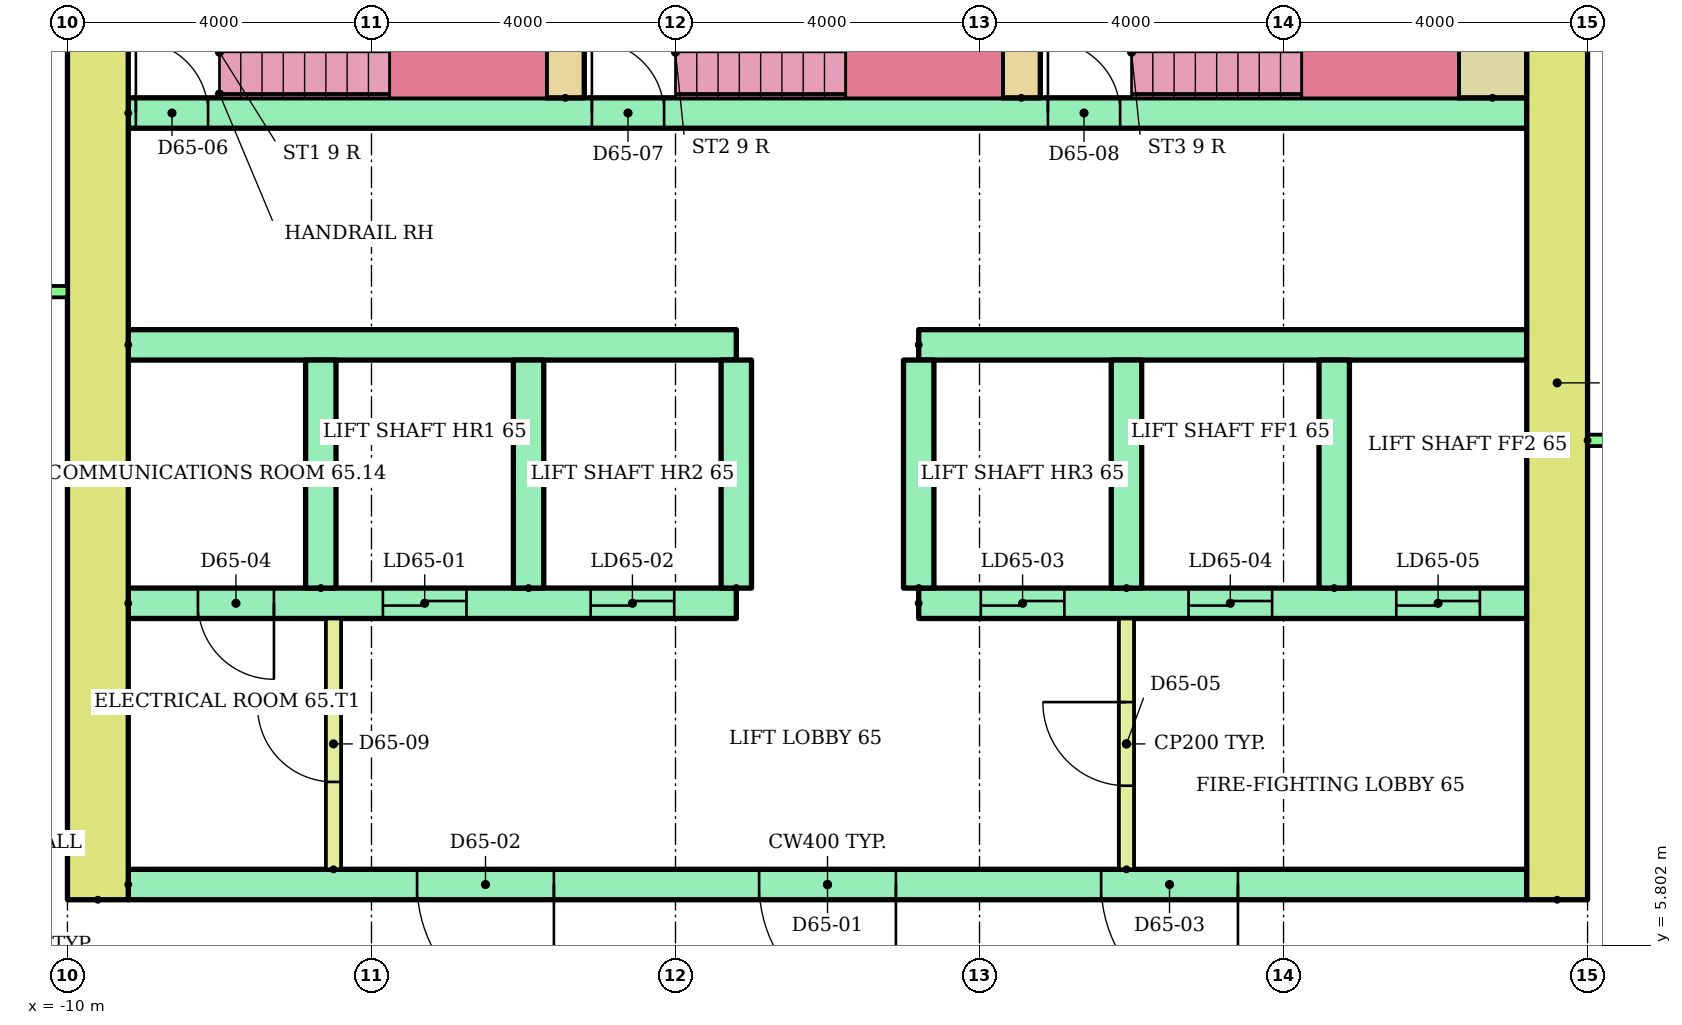
"""IFC4 building model, lengths in metres.
Left out: names, types, materials, properties, quantities, classifications, styles, units other than length and angle.
Written with IfcOpenShell. Run it as: python <this file> out.ifc"""

import sys

from ifc_helpers import new_model, si_unit, direction, frame, frame_2d, origin, place, context, subcontext, project, spatial, rectangle, extrude, element, fill, save


model = new_model("IFC4")
c1 = context("Model", 3, precision=1e-05, world=origin(), true_north=direction((0.0, 1.0)))
c2 = subcontext(c1, "Body", "Model", "MODEL_VIEW")
j1 = project(units=[si_unit("LENGTHUNIT", "METRE"), si_unit("PLANEANGLEUNIT", "RADIAN")], contexts=[c1])
p1 = place(None, origin())
s1 = spatial("IfcSite", under=j1, at=p1, CompositionType="ELEMENT")
p2 = place(p1, origin())
s2 = spatial("IfcBuilding", under=s1, at=p2, CompositionType="ELEMENT")
p3 = place(p2, frame((0.0, 0.0, 253.1)))
s3 = spatial("IfcBuildingStorey", under=s2, at=p3, CompositionType="ELEMENT", Elevation=253.1)
for number, where, z_axis, x_axis in (
    (1, (-9.6, 6.4, 0.0), (0.0, 0.0, 1.0), (0.0, 1.0, 0.0)),
    (2, (9.6, 6.4, 0.0), (0.0, 0.0, 1.0), (0.0, 1.0, 0.0)),
):
    element("IfcWall", number, at=place(p3, frame(where, z_axis=z_axis, x_axis=x_axis)), inside=s3, PredefinedType="SHEAR", context=c2, shape_type="SweptSolid", body=[
        extrude(rectangle(XDim=13.6, YDim=0.8, at=frame_2d((6.8, 0.0))), origin(), (0.0, 0.0, 1.0), 2.92),
    ])
p4 = place(p3, frame((-9.2, 6.6, 0.0)))
e3 = element("IfcWall", 3, at=p4, inside=s3, PredefinedType="SHEAR", context=c2, shape_type="SweptSolid", body=[
    extrude(rectangle(XDim=18.4, YDim=0.4, at=frame_2d((9.2, 0.0))), origin(), (0.0, 0.0, 1.0), 2.92),
])
p5 = place(p4, frame((8.3, 0.0, 0.0)))
e4 = element("IfcOpeningElement", 4, at=p5, cuts=e3, PredefinedType="OPENING", context=c2, shape_type="SweptSolid", body=[
    extrude(rectangle(XDim=1.8, YDim=2.1, at=frame_2d((0.9, 1.05))), frame((0.0, 0.21, 0.0), z_axis=(0.0, -1.0, 0.0), x_axis=(1.0, 0.0, 0.0)), (0.0, 0.0, 1.0), 0.42),
])
p6 = place(p4, frame((3.8, 0.0, 0.0)))
e5 = element("IfcOpeningElement", 5, at=p6, cuts=e3, PredefinedType="OPENING", context=c2, shape_type="SweptSolid", body=[
    extrude(rectangle(XDim=1.8, YDim=2.1, at=frame_2d((0.9, 1.05))), frame((0.0, 0.21, 0.0), z_axis=(0.0, -1.0, 0.0), x_axis=(1.0, 0.0, 0.0)), (0.0, 0.0, 1.0), 0.42),
])
p7 = place(p4, frame((12.8, 0.0, 0.0)))
e6 = element("IfcOpeningElement", 6, at=p7, cuts=e3, PredefinedType="OPENING", context=c2, shape_type="SweptSolid", body=[
    extrude(rectangle(XDim=1.8, YDim=2.1, at=frame_2d((0.9, 1.05))), frame((0.0, 0.21, 0.0), z_axis=(0.0, -1.0, 0.0), x_axis=(1.0, 0.0, 0.0)), (0.0, 0.0, 1.0), 0.42),
])
p8 = place(p3, frame((-9.2, 10.3, 0.0)))
e7 = element("IfcWall", 7, at=p8, inside=s3, PredefinedType="SHEAR", context=c2, shape_type="SweptSolid", body=[
    extrude(rectangle(XDim=8.0, YDim=0.4, at=frame_2d((4.0, 0.0))), origin(), (0.0, 0.0, 1.0), 2.92),
])
p9 = place(p8, frame((3.35, 0.0, 0.0)))
e8 = element("IfcOpeningElement", 8, at=p9, cuts=e7, PredefinedType="OPENING", context=c2, shape_type="SweptSolid", body=[
    extrude(rectangle(XDim=1.1, YDim=2.1, at=frame_2d((0.55, 1.05))), frame((0.0, 0.21, 0.0), z_axis=(0.0, -1.0, 0.0), x_axis=(1.0, 0.0, 0.0)), (0.0, 0.0, 1.0), 0.42),
])
p10 = place(p8, frame((6.083, 0.0, 0.0)))
e9 = element("IfcOpeningElement", 9, at=p10, cuts=e7, PredefinedType="OPENING", context=c2, shape_type="SweptSolid", body=[
    extrude(rectangle(XDim=1.1, YDim=2.1, at=frame_2d((0.55, 1.05))), frame((0.0, 0.21, 0.0), z_axis=(0.0, -1.0, 0.0), x_axis=(1.0, 0.0, 0.0)), (0.0, 0.0, 1.0), 0.42),
])
p11 = place(p8, frame((0.917, 0.0, 0.0)))
e10 = element("IfcOpeningElement", 10, at=p11, cuts=e7, PredefinedType="OPENING", context=c2, shape_type="SweptSolid", body=[
    extrude(rectangle(XDim=1.0, YDim=2.1, at=frame_2d((0.5, 1.05))), frame((0.0, 0.21, 0.0), z_axis=(0.0, -1.0, 0.0), x_axis=(1.0, 0.0, 0.0)), (0.0, 0.0, 1.0), 0.42),
])
p12 = place(p3, frame((-9.2, 13.7, 0.0)))
e11 = element("IfcWall", 11, at=p12, inside=s3, PredefinedType="SHEAR", context=c2, shape_type="SweptSolid", body=[
    extrude(rectangle(XDim=8.0, YDim=0.4, at=frame_2d((4.0, 0.0))), origin(), (0.0, 0.0, 1.0), 2.92),
])
p13 = place(p3, frame((1.2, 10.3, 0.0)))
e12 = element("IfcWall", 12, at=p13, inside=s3, PredefinedType="SHEAR", context=c2, shape_type="SweptSolid", body=[
    extrude(rectangle(XDim=8.0, YDim=0.4, at=frame_2d((4.0, 0.0))), origin(), (0.0, 0.0, 1.0), 2.92),
])
p14 = place(p13, frame((0.817, 0.0, 0.0)))
e13 = element("IfcOpeningElement", 13, at=p14, cuts=e12, PredefinedType="OPENING", context=c2, shape_type="SweptSolid", body=[
    extrude(rectangle(XDim=1.1, YDim=2.1, at=frame_2d((0.55, 1.05))), frame((0.0, 0.21, 0.0), z_axis=(0.0, -1.0, 0.0), x_axis=(1.0, 0.0, 0.0)), (0.0, 0.0, 1.0), 0.42),
])
p15 = place(p13, frame((3.55, 0.0, 0.0)))
e14 = element("IfcOpeningElement", 14, at=p15, cuts=e12, PredefinedType="OPENING", context=c2, shape_type="SweptSolid", body=[
    extrude(rectangle(XDim=1.1, YDim=2.1, at=frame_2d((0.55, 1.05))), frame((0.0, 0.21, 0.0), z_axis=(0.0, -1.0, 0.0), x_axis=(1.0, 0.0, 0.0)), (0.0, 0.0, 1.0), 0.42),
])
p16 = place(p13, frame((6.283, 0.0, 0.0)))
e15 = element("IfcOpeningElement", 15, at=p16, cuts=e12, PredefinedType="OPENING", context=c2, shape_type="SweptSolid", body=[
    extrude(rectangle(XDim=1.1, YDim=2.1, at=frame_2d((0.55, 1.05))), frame((0.0, 0.21, 0.0), z_axis=(0.0, -1.0, 0.0), x_axis=(1.0, 0.0, 0.0)), (0.0, 0.0, 1.0), 0.42),
])
p17 = place(p3, frame((1.2, 13.7, 0.0)))
e16 = element("IfcWall", 16, at=p17, inside=s3, PredefinedType="SHEAR", context=c2, shape_type="SweptSolid", body=[
    extrude(rectangle(XDim=8.0, YDim=0.4, at=frame_2d((4.0, 0.0))), origin(), (0.0, 0.0, 1.0), 2.92),
])
for number, where, z_axis, x_axis in (
    (17, (-6.667, 10.5, 0.0), (0.0, 0.0, 1.0), (0.0, 1.0, 0.0)),
    (18, (-3.933, 10.5, 0.0), (0.0, 0.0, 1.0), (0.0, 1.0, 0.0)),
    (19, (-1.2, 10.5, 0.0), (0.0, 0.0, 1.0), (0.0, 1.0, 0.0)),
    (20, (1.2, 10.5, 0.0), (0.0, 0.0, 1.0), (0.0, 1.0, 0.0)),
    (21, (3.933, 10.5, 0.0), (0.0, 0.0, 1.0), (0.0, 1.0, 0.0)),
    (22, (6.667, 10.5, 0.0), (0.0, 0.0, 1.0), (0.0, 1.0, 0.0)),
):
    element("IfcWall", number, at=place(p3, frame(where, z_axis=z_axis, x_axis=x_axis)), inside=s3, PredefinedType="SHEAR", context=c2, shape_type="SweptSolid", body=[
        extrude(rectangle(XDim=3.0, YDim=0.4, at=frame_2d((1.5, 0.0))), origin(), (0.0, 0.0, 1.0), 2.92),
    ])
p18 = place(p3, frame((3.933, 6.8, 0.0), z_axis=(0.0, 0.0, 1.0), x_axis=(0.0, 1.0, 0.0)))
e23 = element("IfcWall", 23, at=p18, inside=s3, PredefinedType="PARTITIONING", context=c2, shape_type="SweptSolid", body=[
    extrude(rectangle(XDim=3.3, YDim=0.2, at=frame_2d((1.65, 0.0))), origin(), (0.0, 0.0, 1.0), 2.92),
])
p19 = place(p18, frame((1.1, 0.0, 0.0)))
e24 = element("IfcOpeningElement", 24, at=p19, cuts=e23, PredefinedType="OPENING", context=c2, shape_type="SweptSolid", body=[
    extrude(rectangle(XDim=1.1, YDim=2.1, at=frame_2d((0.55, 1.05))), frame((0.0, 0.11, 0.0), z_axis=(0.0, -1.0, 0.0), x_axis=(1.0, 0.0, 0.0)), (0.0, 0.0, 1.0), 0.22),
])
p20 = place(p3, frame((-9.2, 16.75, 0.0)))
e25 = element("IfcWall", 25, at=p20, inside=s3, PredefinedType="SHEAR", context=c2, shape_type="SweptSolid", body=[
    extrude(rectangle(XDim=18.4, YDim=0.4, at=frame_2d((9.2, 0.0))), origin(), (0.0, 0.0, 1.0), 2.92),
])
p21 = place(p20, frame((0.1, 0.0, 0.0)))
e26 = element("IfcOpeningElement", 26, at=p21, cuts=e25, PredefinedType="OPENING", context=c2, shape_type="SweptSolid", body=[
    extrude(rectangle(XDim=0.95, YDim=2.1, at=frame_2d((0.475, 1.05))), frame((0.0, 0.21, 0.0), z_axis=(0.0, -1.0, 0.0), x_axis=(1.0, 0.0, 0.0)), (0.0, 0.0, 1.0), 0.42),
])
p22 = place(p20, frame((6.1, 0.0, 0.0)))
e27 = element("IfcOpeningElement", 27, at=p22, cuts=e25, PredefinedType="OPENING", context=c2, shape_type="SweptSolid", body=[
    extrude(rectangle(XDim=0.95, YDim=2.1, at=frame_2d((0.475, 1.05))), frame((0.0, 0.21, 0.0), z_axis=(0.0, -1.0, 0.0), x_axis=(1.0, 0.0, 0.0)), (0.0, 0.0, 1.0), 0.42),
])
p23 = place(p20, frame((12.1, 0.0, 0.0)))
e28 = element("IfcOpeningElement", 28, at=p23, cuts=e25, PredefinedType="OPENING", context=c2, shape_type="SweptSolid", body=[
    extrude(rectangle(XDim=0.95, YDim=2.1, at=frame_2d((0.475, 1.05))), frame((0.0, 0.21, 0.0), z_axis=(0.0, -1.0, 0.0), x_axis=(1.0, 0.0, 0.0)), (0.0, 0.0, 1.0), 0.42),
])
for number, where, z_axis, x_axis in (
    (29, (-3.45, 16.95, 0.0), (0.0, 0.0, 1.0), (0.0, 1.0, 0.0)),
    (30, (2.55, 16.95, 0.0), (0.0, 0.0, 1.0), (0.0, 1.0, 0.0)),
):
    element("IfcWall", number, at=place(p3, frame(where, z_axis=z_axis, x_axis=x_axis)), inside=s3, PredefinedType="SHEAR", context=c2, shape_type="SweptSolid", body=[
        extrude(rectangle(XDim=2.55, YDim=0.5, at=frame_2d((1.275, 0.0))), origin(), (0.0, 0.0, 1.0), 2.92),
    ])
p24 = place(p3, frame((8.75, 16.95, 0.0), z_axis=(0.0, 0.0, 1.0), x_axis=(0.0, 1.0, 0.0)))
e31 = element("IfcWall", 31, at=p24, inside=s3, PredefinedType="SHEAR", context=c2, shape_type="SweptSolid", body=[
    extrude(rectangle(XDim=2.55, YDim=0.9, at=frame_2d((1.275, 0.0))), origin(), (0.0, 0.0, 1.0), 2.92),
])
p25 = place(p3, frame((-6.5, 6.8, 0.0), z_axis=(0.0, 0.0, 1.0), x_axis=(0.0, 1.0, 0.0)))
e32 = element("IfcWall", 32, at=p25, inside=s3, PredefinedType="PARTITIONING", context=c2, shape_type="SweptSolid", body=[
    extrude(rectangle(XDim=3.3, YDim=0.2, at=frame_2d((1.65, 0.0))), origin(), (0.0, 0.0, 1.0), 2.92),
])
p26 = place(p25, frame((1.15, 0.0, 0.0)))
e33 = element("IfcOpeningElement", 33, at=p26, cuts=e32, PredefinedType="OPENING", context=c2, shape_type="SweptSolid", body=[
    extrude(rectangle(XDim=1.0, YDim=2.1, at=frame_2d((0.5, 1.05))), frame((0.0, 0.11, 0.0), z_axis=(0.0, -1.0, 0.0), x_axis=(1.0, 0.0, 0.0)), (0.0, 0.0, 1.0), 0.22),
])
p27 = place(p3, frame((-21.89, 14.4, 0.0)))
e34 = element("IfcWall", 34, at=p27, inside=s3, PredefinedType="PARTITIONING", context=c2, shape_type="SweptSolid", body=[
    extrude(rectangle(XDim=11.89, YDim=0.15, at=frame_2d((5.945, 0.0))), origin(), (0.0, 0.0, 1.0), 2.4),
])
p28 = place(p27, frame((1.26, 0.0, 0.0)))
e35 = element("IfcOpeningElement", 35, at=p28, cuts=e34, PredefinedType="OPENING", context=c2, shape_type="SweptSolid", body=[
    extrude(rectangle(XDim=1.0, YDim=2.1, at=frame_2d((0.5, 1.05))), frame((0.0, 0.085, 0.0), z_axis=(0.0, -1.0, 0.0), x_axis=(1.0, 0.0, 0.0)), (0.0, 0.0, 1.0), 0.17),
])
p29 = place(p27, frame((8.304, 0.0, 0.0)))
e36 = element("IfcOpeningElement", 36, at=p29, cuts=e34, PredefinedType="OPENING", context=c2, shape_type="SweptSolid", body=[
    extrude(rectangle(XDim=0.9, YDim=2.1, at=frame_2d((0.45, 1.05))), frame((0.0, 0.085, 0.0), z_axis=(0.0, -1.0, 0.0), x_axis=(1.0, 0.0, 0.0)), (0.0, 0.0, 1.0), 0.17),
])
p30 = place(p3, frame((10.0, 12.443, 0.0)))
e37 = element("IfcWall", 37, at=p30, inside=s3, PredefinedType="PARTITIONING", context=c2, shape_type="SweptSolid", body=[
    extrude(rectangle(XDim=22.244, YDim=0.15, at=frame_2d((11.122, 0.0))), origin(), (0.0, 0.0, 1.0), 2.4),
])
p31 = place(p30, frame((3.47, 0.0, 0.0)))
e38 = element("IfcOpeningElement", 38, at=p31, cuts=e37, PredefinedType="OPENING", context=c2, shape_type="SweptSolid", body=[
    extrude(rectangle(XDim=0.9, YDim=2.1, at=frame_2d((0.45, 1.05))), frame((0.0, 0.085, 0.0), z_axis=(0.0, -1.0, 0.0), x_axis=(1.0, 0.0, 0.0)), (0.0, 0.0, 1.0), 0.17),
])
p32 = place(p30, frame((11.318, 0.0, 0.0)))
e39 = element("IfcOpeningElement", 39, at=p32, cuts=e37, PredefinedType="OPENING", context=c2, shape_type="SweptSolid", body=[
    extrude(rectangle(XDim=1.0, YDim=2.1, at=frame_2d((0.5, 1.05))), frame((0.0, 0.085, 0.0), z_axis=(0.0, -1.0, 0.0), x_axis=(1.0, 0.0, 0.0)), (0.0, 0.0, 1.0), 0.17),
])
p33 = place(p30, frame((18.477, 0.0, 0.0)))
e40 = element("IfcOpeningElement", 40, at=p33, cuts=e37, PredefinedType="OPENING", context=c2, shape_type="SweptSolid", body=[
    extrude(rectangle(XDim=0.9, YDim=2.1, at=frame_2d((0.45, 1.05))), frame((0.0, 0.085, 0.0), z_axis=(0.0, -1.0, 0.0), x_axis=(1.0, 0.0, 0.0)), (0.0, 0.0, 1.0), 0.17),
])
p34 = place(p5, frame((1.8, 0.0, 0.0), z_axis=(0.0, 0.0, 1.0), x_axis=(-1.0, 0.0, 0.0)))
e41 = element("IfcDoor", 41, at=p34, inside=s3, OperationType="DOUBLE_DOOR_SINGLE_SWING", PredefinedType="DOOR", context=c2, shape_type="SweptSolid", body=[
    extrude(rectangle(XDim=1.8, YDim=2.1, at=frame_2d((0.9, 1.05))), frame((0.0, 0.025, 0.0), z_axis=(0.0, -1.0, 0.0), x_axis=(1.0, 0.0, 0.0)), (0.0, 0.0, 1.0), 0.05),
])
fill(e4, e41)
p35 = place(p6, frame((1.8, 0.0, 0.0), z_axis=(0.0, 0.0, 1.0), x_axis=(-1.0, 0.0, 0.0)))
e42 = element("IfcDoor", 42, at=p35, inside=s3, OperationType="DOUBLE_DOOR_SINGLE_SWING", PredefinedType="DOOR", context=c2, shape_type="SweptSolid", body=[
    extrude(rectangle(XDim=1.8, YDim=2.1, at=frame_2d((0.9, 1.05))), frame((0.0, 0.025, 0.0), z_axis=(0.0, -1.0, 0.0), x_axis=(1.0, 0.0, 0.0)), (0.0, 0.0, 1.0), 0.05),
])
fill(e5, e42)
p36 = place(p7, frame((1.8, 0.0, 0.0), z_axis=(0.0, 0.0, 1.0), x_axis=(-1.0, 0.0, 0.0)))
e43 = element("IfcDoor", 43, at=p36, inside=s3, OperationType="DOUBLE_DOOR_SINGLE_SWING", PredefinedType="DOOR", context=c2, shape_type="SweptSolid", body=[
    extrude(rectangle(XDim=1.8, YDim=2.1, at=frame_2d((0.9, 1.05))), frame((0.0, 0.025, 0.0), z_axis=(0.0, -1.0, 0.0), x_axis=(1.0, 0.0, 0.0)), (0.0, 0.0, 1.0), 0.05),
])
fill(e6, e43)
p37 = place(p9, origin())
e44 = element("IfcDoor", 44, at=p37, inside=s3, OperationType="SLIDING_TO_LEFT", PredefinedType="DOOR", context=c2, shape_type="SweptSolid", body=[
    extrude(rectangle(XDim=1.1, YDim=2.1, at=frame_2d((0.55, 1.05))), frame((0.0, 0.025, 0.0), z_axis=(0.0, -1.0, 0.0), x_axis=(1.0, 0.0, 0.0)), (0.0, 0.0, 1.0), 0.05),
])
fill(e8, e44)
p38 = place(p10, origin())
e45 = element("IfcDoor", 45, at=p38, inside=s3, OperationType="SLIDING_TO_LEFT", PredefinedType="DOOR", context=c2, shape_type="SweptSolid", body=[
    extrude(rectangle(XDim=1.1, YDim=2.1, at=frame_2d((0.55, 1.05))), frame((0.0, 0.025, 0.0), z_axis=(0.0, -1.0, 0.0), x_axis=(1.0, 0.0, 0.0)), (0.0, 0.0, 1.0), 0.05),
])
fill(e9, e45)
p39 = place(p14, origin())
e46 = element("IfcDoor", 46, at=p39, inside=s3, OperationType="SLIDING_TO_LEFT", PredefinedType="DOOR", context=c2, shape_type="SweptSolid", body=[
    extrude(rectangle(XDim=1.1, YDim=2.1, at=frame_2d((0.55, 1.05))), frame((0.0, 0.025, 0.0), z_axis=(0.0, -1.0, 0.0), x_axis=(1.0, 0.0, 0.0)), (0.0, 0.0, 1.0), 0.05),
])
fill(e13, e46)
p40 = place(p15, origin())
e47 = element("IfcDoor", 47, at=p40, inside=s3, OperationType="SLIDING_TO_LEFT", PredefinedType="DOOR", context=c2, shape_type="SweptSolid", body=[
    extrude(rectangle(XDim=1.1, YDim=2.1, at=frame_2d((0.55, 1.05))), frame((0.0, 0.025, 0.0), z_axis=(0.0, -1.0, 0.0), x_axis=(1.0, 0.0, 0.0)), (0.0, 0.0, 1.0), 0.05),
])
fill(e14, e47)
p41 = place(p16, origin())
e48 = element("IfcDoor", 48, at=p41, inside=s3, OperationType="SLIDING_TO_LEFT", PredefinedType="DOOR", context=c2, shape_type="SweptSolid", body=[
    extrude(rectangle(XDim=1.1, YDim=2.1, at=frame_2d((0.55, 1.05))), frame((0.0, 0.025, 0.0), z_axis=(0.0, -1.0, 0.0), x_axis=(1.0, 0.0, 0.0)), (0.0, 0.0, 1.0), 0.05),
])
fill(e15, e48)
p42 = place(p11, frame((1.0, 0.0, 0.0), z_axis=(0.0, 0.0, 1.0), x_axis=(-1.0, 0.0, 0.0)))
e49 = element("IfcDoor", 49, at=p42, inside=s3, OperationType="SINGLE_SWING_RIGHT", PredefinedType="DOOR", context=c2, shape_type="SweptSolid", body=[
    extrude(rectangle(XDim=1.0, YDim=2.1, at=frame_2d((0.5, 1.05))), frame((0.0, 0.025, 0.0), z_axis=(0.0, -1.0, 0.0), x_axis=(1.0, 0.0, 0.0)), (0.0, 0.0, 1.0), 0.05),
])
fill(e10, e49)
p43 = place(p19, origin())
e50 = element("IfcDoor", 50, at=p43, inside=s3, OperationType="SINGLE_SWING_RIGHT", PredefinedType="DOOR", context=c2, shape_type="SweptSolid", body=[
    extrude(rectangle(XDim=1.1, YDim=2.1, at=frame_2d((0.55, 1.05))), frame((0.0, 0.025, 0.0), z_axis=(0.0, -1.0, 0.0), x_axis=(1.0, 0.0, 0.0)), (0.0, 0.0, 1.0), 0.05),
])
fill(e24, e50)
p44 = place(p21, origin())
e51 = element("IfcDoor", 51, at=p44, inside=s3, OperationType="SINGLE_SWING_LEFT", PredefinedType="DOOR", context=c2, shape_type="SweptSolid", body=[
    extrude(rectangle(XDim=0.95, YDim=2.1, at=frame_2d((0.475, 1.05))), frame((0.0, 0.025, 0.0), z_axis=(0.0, -1.0, 0.0), x_axis=(1.0, 0.0, 0.0)), (0.0, 0.0, 1.0), 0.05),
])
fill(e26, e51)
p45 = place(p22, origin())
e52 = element("IfcDoor", 52, at=p45, inside=s3, OperationType="SINGLE_SWING_LEFT", PredefinedType="DOOR", context=c2, shape_type="SweptSolid", body=[
    extrude(rectangle(XDim=0.95, YDim=2.1, at=frame_2d((0.475, 1.05))), frame((0.0, 0.025, 0.0), z_axis=(0.0, -1.0, 0.0), x_axis=(1.0, 0.0, 0.0)), (0.0, 0.0, 1.0), 0.05),
])
fill(e27, e52)
p46 = place(p23, origin())
e53 = element("IfcDoor", 53, at=p46, inside=s3, OperationType="SINGLE_SWING_LEFT", PredefinedType="DOOR", context=c2, shape_type="SweptSolid", body=[
    extrude(rectangle(XDim=0.95, YDim=2.1, at=frame_2d((0.475, 1.05))), frame((0.0, 0.025, 0.0), z_axis=(0.0, -1.0, 0.0), x_axis=(1.0, 0.0, 0.0)), (0.0, 0.0, 1.0), 0.05),
])
fill(e28, e53)
p47 = place(p26, origin())
e54 = element("IfcDoor", 54, at=p47, inside=s3, OperationType="SINGLE_SWING_RIGHT", PredefinedType="DOOR", context=c2, shape_type="SweptSolid", body=[
    extrude(rectangle(XDim=1.0, YDim=2.1, at=frame_2d((0.5, 1.05))), frame((0.0, 0.025, 0.0), z_axis=(0.0, -1.0, 0.0), x_axis=(1.0, 0.0, 0.0)), (0.0, 0.0, 1.0), 0.05),
])
fill(e33, e54)
save(model, sys.argv[1])
